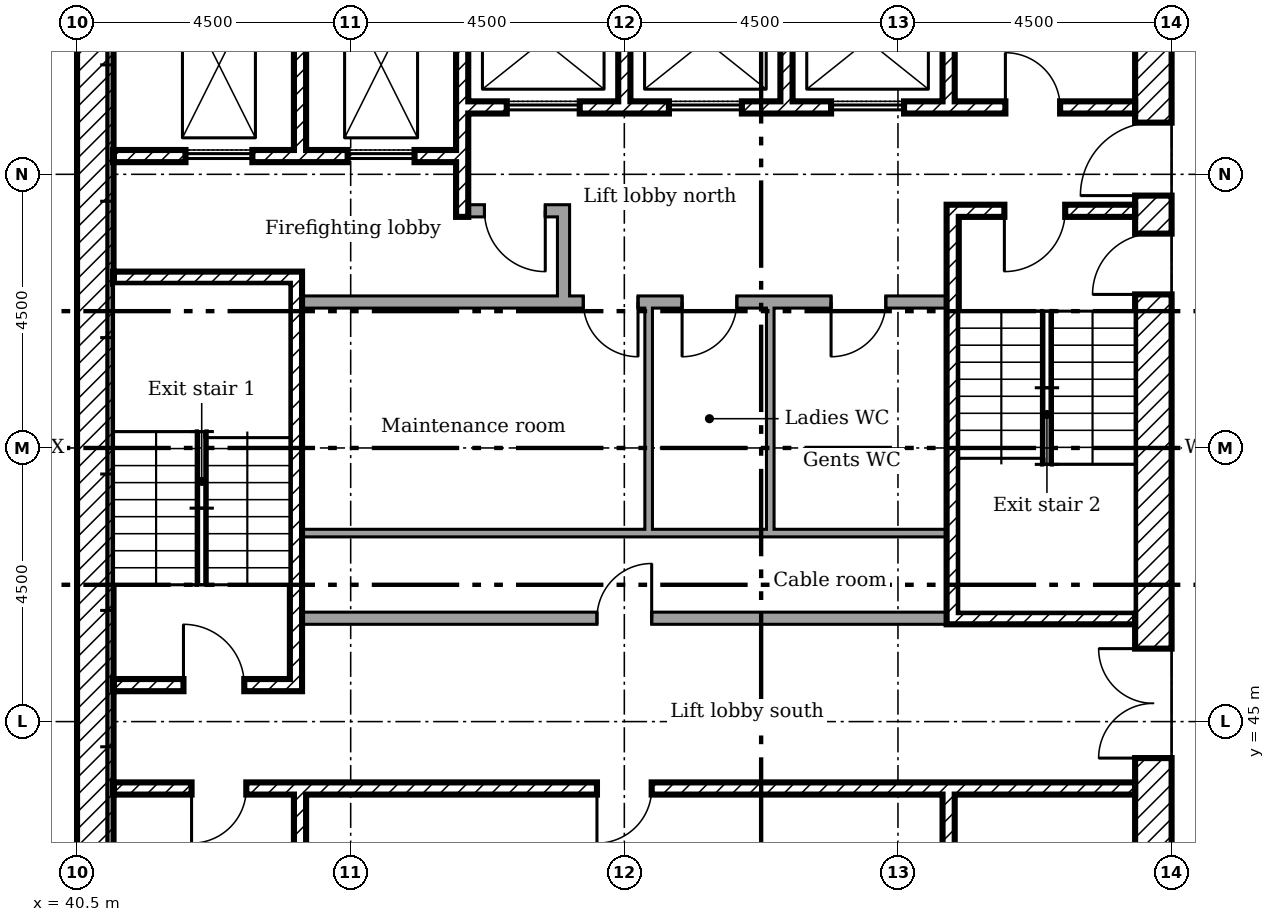
"""IFC4 building model, lengths in metres.
Left out: names, types, materials, properties, quantities, classifications, styles, units other than length and angle.
Written with IfcOpenShell. Run it as: python <this file> out.ifc"""

import sys

from ifc_helpers import new_model, si_unit, direction, frame, frame_2d, origin, place, context, subcontext, project, spatial, rectangle, extrude, element, fill, save


model = new_model("IFC4")
c1 = context("Model", 3, precision=1e-05, world=origin(), true_north=direction((0.0, 1.0)))
c2 = subcontext(c1, "Body", "Model", "MODEL_VIEW")
j1 = project(units=[si_unit("LENGTHUNIT", "METRE"), si_unit("PLANEANGLEUNIT", "RADIAN")], contexts=[c1])
p1 = place(None, origin())
s1 = spatial("IfcSite", under=j1, at=p1, CompositionType="ELEMENT")
p2 = place(p1, origin())
s2 = spatial("IfcBuilding", under=s1, at=p2, CompositionType="ELEMENT")
p3 = place(p2, frame((0.0, 0.0, 176.2)))
s3 = spatial("IfcBuildingStorey", under=s2, at=p3, CompositionType="ELEMENT", Elevation=176.2)
p4 = place(p3, frame((58.2, 40.5, 0.0), z_axis=(0.0, 0.0, 1.0), x_axis=(0.0, 1.0, 0.0)))
e1 = element("IfcWall", 1, at=p4, inside=s3, PredefinedType="SHEAR", context=c2, shape_type="SweptSolid", body=[
    extrude(rectangle(XDim=18.0, YDim=0.6, at=frame_2d((9.0, 0.0))), origin(), (0.0, 0.0, 1.0), 3.35),
])
p5 = place(p4, frame((13.15, 0.0, 0.0)))
e2 = element("IfcOpeningElement", 2, at=p5, cuts=e1, PredefinedType="OPENING", context=c2, shape_type="SweptSolid", body=[
    extrude(rectangle(XDim=1.2, YDim=2.1, at=frame_2d((0.6, 1.05))), frame((0.0, 0.31, 0.0), z_axis=(0.0, -1.0, 0.0), x_axis=(1.0, 0.0, 0.0)), (0.0, 0.0, 1.0), 0.62),
])
p6 = place(p4, frame((3.9, 0.0, 0.0)))
e3 = element("IfcOpeningElement", 3, at=p6, cuts=e1, PredefinedType="OPENING", context=c2, shape_type="SweptSolid", body=[
    extrude(rectangle(XDim=1.8, YDim=2.1, at=frame_2d((0.9, 1.05))), frame((0.0, 0.31, 0.0), z_axis=(0.0, -1.0, 0.0), x_axis=(1.0, 0.0, 0.0)), (0.0, 0.0, 1.0), 0.62),
])
p7 = place(p4, frame((11.525, 0.0, 0.0)))
e4 = element("IfcOpeningElement", 4, at=p7, cuts=e1, PredefinedType="OPENING", context=c2, shape_type="SweptSolid", body=[
    extrude(rectangle(XDim=1.0, YDim=2.1, at=frame_2d((0.5, 1.05))), frame((0.0, 0.31, 0.0), z_axis=(0.0, -1.0, 0.0), x_axis=(1.0, 0.0, 0.0)), (0.0, 0.0, 1.0), 0.62),
])
p8 = place(p3, frame((40.8, 41.1, 0.0), z_axis=(0.0, 0.0, 1.0), x_axis=(0.0, 1.0, 0.0)))
e5 = element("IfcWall", 5, at=p8, inside=s3, PredefinedType="SHEAR", context=c2, shape_type="SweptSolid", body=[
    extrude(rectangle(XDim=16.8, YDim=0.6, at=frame_2d((8.4, 0.0))), origin(), (0.0, 0.0, 1.0), 3.35),
])
p9 = place(p3, frame((44.167, 57.9, 0.0), z_axis=(0.0, 0.0, 1.0), x_axis=(0.0, -1.0, 0.0)))
e6 = element("IfcWall", 6, at=p9, inside=s3, PredefinedType="SHEAR", context=c2, shape_type="SweptSolid", body=[
    extrude(rectangle(XDim=3.5, YDim=0.2, at=frame_2d((1.75, 0.0))), origin(), (0.0, 0.0, 1.0), 3.35),
])
p10 = place(p3, frame((46.833, 57.9, 0.0), z_axis=(0.0, 0.0, 1.0), x_axis=(0.0, -1.0, 0.0)))
e7 = element("IfcWall", 7, at=p10, inside=s3, PredefinedType="SHEAR", context=c2, shape_type="SweptSolid", body=[
    extrude(rectangle(XDim=4.6, YDim=0.2, at=frame_2d((2.3, 0.0))), origin(), (0.0, 0.0, 1.0), 3.35),
])
for number, where, z_axis, x_axis in (
    (8, (49.5, 57.9, 0.0), (0.0, 0.0, 1.0), (0.0, -1.0, 0.0)),
    (9, (52.167, 57.9, 0.0), (0.0, 0.0, 1.0), (0.0, -1.0, 0.0)),
    (10, (54.833, 57.9, 0.0), (0.0, 0.0, 1.0), (0.0, -1.0, 0.0)),
    (11, (44.167, 41.1, 0.0), (0.0, 0.0, 1.0), (0.0, 1.0, 0.0)),
    (12, (54.833, 41.1, 0.0), (0.0, 0.0, 1.0), (0.0, 1.0, 0.0)),
):
    element("IfcWall", number, at=place(p3, frame(where, z_axis=z_axis, x_axis=x_axis)), inside=s3, PredefinedType="SHEAR", context=c2, shape_type="SweptSolid", body=[
        extrude(rectangle(XDim=2.7, YDim=0.2, at=frame_2d((1.35, 0.0))), origin(), (0.0, 0.0, 1.0), 3.35),
    ])
p11 = place(p3, frame((48.5, 51.9, 0.0), z_axis=(0.0, 0.0, 1.0), x_axis=(0.0, 1.0, 0.0)))
e13 = element("IfcWall", 13, at=p11, inside=s3, PredefinedType="PARTITIONING", context=c2, shape_type="SweptSolid", body=[
    extrude(rectangle(XDim=1.6, YDim=0.2, at=frame_2d((0.8, 0.0))), origin(), (0.0, 0.0, 1.0), 3.35),
])
p12 = place(p3, frame((46.933, 53.4, 0.0)))
e14 = element("IfcWall", 14, at=p12, inside=s3, PredefinedType="PARTITIONING", context=c2, shape_type="SweptSolid", body=[
    extrude(rectangle(XDim=1.467, YDim=0.2, at=frame_2d((0.733, 0.0))), origin(), (0.0, 0.0, 1.0), 3.35),
])
p13 = place(p12, frame((0.267, 0.0, 0.0)))
e15 = element("IfcOpeningElement", 15, at=p13, cuts=e14, PredefinedType="OPENING", context=c2, shape_type="SweptSolid", body=[
    extrude(rectangle(XDim=1.0, YDim=2.1, at=frame_2d((0.5, 1.05))), frame((0.0, 0.11, 0.0), z_axis=(0.0, -1.0, 0.0), x_axis=(1.0, 0.0, 0.0)), (0.0, 0.0, 1.0), 0.22),
])
p14 = place(p3, frame((46.933, 55.1, 0.0)))
e16 = element("IfcWall", 16, at=p14, inside=s3, PredefinedType="SHEAR", context=c2, shape_type="SweptSolid", body=[
    extrude(rectangle(XDim=10.967, YDim=0.2, at=frame_2d((5.483, 0.0))), origin(), (0.0, 0.0, 1.0), 3.35),
])
p15 = place(p14, frame((8.833, 0.0, 0.0)))
e17 = element("IfcOpeningElement", 17, at=p15, cuts=e16, PredefinedType="OPENING", context=c2, shape_type="SweptSolid", body=[
    extrude(rectangle(XDim=0.9, YDim=2.1, at=frame_2d((0.45, 1.05))), frame((0.0, 0.11, 0.0), z_axis=(0.0, -1.0, 0.0), x_axis=(1.0, 0.0, 0.0)), (0.0, 0.0, 1.0), 0.22),
])
p16 = place(p14, frame((0.633, 0.0, 0.0)))
e18 = element("IfcOpeningElement", 18, at=p16, cuts=e16, PredefinedType="OPENING", context=c2, shape_type="SweptSolid", body=[
    extrude(rectangle(XDim=1.2, YDim=2.1, at=frame_2d((0.6, 1.05))), frame((0.0, 0.11, 0.0), z_axis=(0.0, -1.0, 0.0), x_axis=(1.0, 0.0, 0.0)), (0.0, 0.0, 1.0), 0.22),
])
p17 = place(p14, frame((3.3, 0.0, 0.0)))
e19 = element("IfcOpeningElement", 19, at=p17, cuts=e16, PredefinedType="OPENING", context=c2, shape_type="SweptSolid", body=[
    extrude(rectangle(XDim=1.2, YDim=2.1, at=frame_2d((0.6, 1.05))), frame((0.0, 0.11, 0.0), z_axis=(0.0, -1.0, 0.0), x_axis=(1.0, 0.0, 0.0)), (0.0, 0.0, 1.0), 0.22),
])
p18 = place(p14, frame((5.967, 0.0, 0.0)))
e20 = element("IfcOpeningElement", 20, at=p18, cuts=e16, PredefinedType="OPENING", context=c2, shape_type="SweptSolid", body=[
    extrude(rectangle(XDim=1.2, YDim=2.1, at=frame_2d((0.6, 1.05))), frame((0.0, 0.11, 0.0), z_axis=(0.0, -1.0, 0.0), x_axis=(1.0, 0.0, 0.0)), (0.0, 0.0, 1.0), 0.22),
])
p19 = place(p3, frame((41.1, 54.3, 0.0)))
e21 = element("IfcWall", 21, at=p19, inside=s3, PredefinedType="SHEAR", context=c2, shape_type="SweptSolid", body=[
    extrude(rectangle(XDim=5.633, YDim=0.2, at=frame_2d((2.817, 0.0))), origin(), (0.0, 0.0, 1.0), 3.35),
])
p20 = place(p19, frame((1.183, 0.0, 0.0)))
e22 = element("IfcOpeningElement", 22, at=p20, cuts=e21, PredefinedType="OPENING", context=c2, shape_type="SweptSolid", body=[
    extrude(rectangle(XDim=1.1, YDim=2.1, at=frame_2d((0.55, 1.05))), frame((0.0, 0.11, 0.0), z_axis=(0.0, -1.0, 0.0), x_axis=(1.0, 0.0, 0.0)), (0.0, 0.0, 1.0), 0.22),
])
p21 = place(p19, frame((3.85, 0.0, 0.0)))
e23 = element("IfcOpeningElement", 23, at=p21, cuts=e21, PredefinedType="OPENING", context=c2, shape_type="SweptSolid", body=[
    extrude(rectangle(XDim=1.1, YDim=2.1, at=frame_2d((0.55, 1.05))), frame((0.0, 0.11, 0.0), z_axis=(0.0, -1.0, 0.0), x_axis=(1.0, 0.0, 0.0)), (0.0, 0.0, 1.0), 0.22),
])
p22 = place(p3, frame((41.1, 43.9, 0.0)))
e24 = element("IfcWall", 24, at=p22, inside=s3, PredefinedType="SHEAR", context=c2, shape_type="SweptSolid", body=[
    extrude(rectangle(XDim=16.8, YDim=0.2, at=frame_2d((8.4, 0.0))), origin(), (0.0, 0.0, 1.0), 3.35),
])
p23 = place(p22, frame((1.283, 0.0, 0.0)))
e25 = element("IfcOpeningElement", 25, at=p23, cuts=e24, PredefinedType="OPENING", context=c2, shape_type="SweptSolid", body=[
    extrude(rectangle(XDim=0.9, YDim=2.1, at=frame_2d((0.45, 1.05))), frame((0.0, 0.11, 0.0), z_axis=(0.0, -1.0, 0.0), x_axis=(1.0, 0.0, 0.0)), (0.0, 0.0, 1.0), 0.22),
])
p24 = place(p22, frame((7.95, 0.0, 0.0)))
e26 = element("IfcOpeningElement", 26, at=p24, cuts=e24, PredefinedType="OPENING", context=c2, shape_type="SweptSolid", body=[
    extrude(rectangle(XDim=0.9, YDim=2.1, at=frame_2d((0.45, 1.05))), frame((0.0, 0.11, 0.0), z_axis=(0.0, -1.0, 0.0), x_axis=(1.0, 0.0, 0.0)), (0.0, 0.0, 1.0), 0.22),
])
p25 = place(p3, frame((44.1, 45.5, 0.0), z_axis=(0.0, 0.0, 1.0), x_axis=(0.0, 1.0, 0.0)))
e27 = element("IfcWall", 27, at=p25, inside=s3, PredefinedType="SHEAR", context=c2, shape_type="SweptSolid", body=[
    extrude(rectangle(XDim=6.9, YDim=0.2, at=frame_2d((3.45, 0.0))), origin(), (0.0, 0.0, 1.0), 3.35),
])
p26 = place(p3, frame((41.1, 52.3, 0.0)))
e28 = element("IfcWall", 28, at=p26, inside=s3, PredefinedType="SHEAR", context=c2, shape_type="SweptSolid", body=[
    extrude(rectangle(XDim=2.9, YDim=0.2, at=frame_2d((1.45, 0.0))), origin(), (0.0, 0.0, 1.0), 3.35),
])
p27 = place(p3, frame((41.1, 45.6, 0.0)))
e29 = element("IfcWall", 29, at=p27, inside=s3, PredefinedType="SHEAR", context=c2, shape_type="SweptSolid", body=[
    extrude(rectangle(XDim=2.9, YDim=0.2, at=frame_2d((1.45, 0.0))), origin(), (0.0, 0.0, 1.0), 3.35),
])
p28 = place(p27, frame((1.15, 0.0, 0.0)))
e30 = element("IfcOpeningElement", 30, at=p28, cuts=e29, PredefinedType="OPENING", context=c2, shape_type="SweptSolid", body=[
    extrude(rectangle(XDim=1.0, YDim=2.1, at=frame_2d((0.5, 1.05))), frame((0.0, 0.11, 0.0), z_axis=(0.0, -1.0, 0.0), x_axis=(1.0, 0.0, 0.0)), (0.0, 0.0, 1.0), 0.22),
])
p29 = place(p3, frame((54.8, 53.4, 0.0)))
e31 = element("IfcWall", 31, at=p29, inside=s3, PredefinedType="SHEAR", context=c2, shape_type="SweptSolid", body=[
    extrude(rectangle(XDim=3.1, YDim=0.2, at=frame_2d((1.55, 0.0))), origin(), (0.0, 0.0, 1.0), 3.35),
])
p30 = place(p29, frame((0.95, 0.0, 0.0)))
e32 = element("IfcOpeningElement", 32, at=p30, cuts=e31, PredefinedType="OPENING", context=c2, shape_type="SweptSolid", body=[
    extrude(rectangle(XDim=1.0, YDim=2.1, at=frame_2d((0.5, 1.05))), frame((0.0, 0.11, 0.0), z_axis=(0.0, -1.0, 0.0), x_axis=(1.0, 0.0, 0.0)), (0.0, 0.0, 1.0), 0.22),
])
p31 = place(p3, frame((54.8, 46.7, 0.0)))
e33 = element("IfcWall", 33, at=p31, inside=s3, PredefinedType="SHEAR", context=c2, shape_type="SweptSolid", body=[
    extrude(rectangle(XDim=3.1, YDim=0.2, at=frame_2d((1.55, 0.0))), origin(), (0.0, 0.0, 1.0), 3.35),
])
p32 = place(p3, frame((54.9, 46.8, 0.0), z_axis=(0.0, 0.0, 1.0), x_axis=(0.0, 1.0, 0.0)))
e34 = element("IfcWall", 34, at=p32, inside=s3, PredefinedType="SHEAR", context=c2, shape_type="SweptSolid", body=[
    extrude(rectangle(XDim=6.5, YDim=0.2, at=frame_2d((3.25, 0.0))), origin(), (0.0, 0.0, 1.0), 3.35),
])
p33 = place(p3, frame((44.2, 51.9, 0.0)))
e35 = element("IfcWall", 35, at=p33, inside=s3, PredefinedType="PARTITIONING", context=c2, shape_type="SweptSolid", body=[
    extrude(rectangle(XDim=10.6, YDim=0.2, at=frame_2d((5.3, 0.0))), origin(), (0.0, 0.0, 1.0), 3.35),
])
p34 = place(p33, frame((4.625, 0.0, 0.0)))
e36 = element("IfcOpeningElement", 36, at=p34, cuts=e35, PredefinedType="OPENING", context=c2, shape_type="SweptSolid", body=[
    extrude(rectangle(XDim=0.9, YDim=2.1, at=frame_2d((0.45, 1.05))), frame((0.0, 0.11, 0.0), z_axis=(0.0, -1.0, 0.0), x_axis=(1.0, 0.0, 0.0)), (0.0, 0.0, 1.0), 0.22),
])
p35 = place(p33, frame((6.25, 0.0, 0.0)))
e37 = element("IfcOpeningElement", 37, at=p35, cuts=e35, PredefinedType="OPENING", context=c2, shape_type="SweptSolid", body=[
    extrude(rectangle(XDim=0.9, YDim=2.1, at=frame_2d((0.45, 1.05))), frame((0.0, 0.11, 0.0), z_axis=(0.0, -1.0, 0.0), x_axis=(1.0, 0.0, 0.0)), (0.0, 0.0, 1.0), 0.22),
])
p36 = place(p33, frame((8.7, 0.0, 0.0)))
e38 = element("IfcOpeningElement", 38, at=p36, cuts=e35, PredefinedType="OPENING", context=c2, shape_type="SweptSolid", body=[
    extrude(rectangle(XDim=0.9, YDim=2.1, at=frame_2d((0.45, 1.05))), frame((0.0, 0.11, 0.0), z_axis=(0.0, -1.0, 0.0), x_axis=(1.0, 0.0, 0.0)), (0.0, 0.0, 1.0), 0.22),
])
p37 = place(p3, frame((44.2, 46.7, 0.0)))
e39 = element("IfcWall", 39, at=p37, inside=s3, PredefinedType="PARTITIONING", context=c2, shape_type="SweptSolid", body=[
    extrude(rectangle(XDim=10.6, YDim=0.2, at=frame_2d((5.3, 0.0))), origin(), (0.0, 0.0, 1.0), 3.35),
])
p38 = place(p37, frame((4.85, 0.0, 0.0)))
e40 = element("IfcOpeningElement", 40, at=p38, cuts=e39, PredefinedType="OPENING", context=c2, shape_type="SweptSolid", body=[
    extrude(rectangle(XDim=0.9, YDim=2.1, at=frame_2d((0.45, 1.05))), frame((0.0, 0.11, 0.0), z_axis=(0.0, -1.0, 0.0), x_axis=(1.0, 0.0, 0.0)), (0.0, 0.0, 1.0), 0.22),
])
p39 = place(p3, frame((49.962, 48.1, 0.0), z_axis=(0.0, 0.0, 1.0), x_axis=(-1.0, 0.0, 0.0)))
e41 = element("IfcWall", 41, at=p39, inside=s3, PredefinedType="PARTITIONING", context=c2, shape_type="SweptSolid", body=[
    extrude(rectangle(XDim=5.762, YDim=0.125, at=frame_2d((2.881, 0.0))), origin(), (0.0, 0.0, 1.0), 3.35),
])
p40 = place(p3, frame((51.962, 48.1, 0.0), z_axis=(0.0, 0.0, 1.0), x_axis=(-1.0, 0.0, 0.0)))
e42 = element("IfcWall", 42, at=p40, inside=s3, PredefinedType="PARTITIONING", context=c2, shape_type="SweptSolid", body=[
    extrude(rectangle(XDim=2.062, YDim=0.125, at=frame_2d((1.031, 0.0))), origin(), (0.0, 0.0, 1.0), 3.35),
])
p41 = place(p3, frame((49.9, 48.163, 0.0), z_axis=(0.0, 0.0, 1.0), x_axis=(0.0, 1.0, 0.0)))
e43 = element("IfcWall", 43, at=p41, inside=s3, PredefinedType="PARTITIONING", context=c2, shape_type="SweptSolid", body=[
    extrude(rectangle(XDim=3.637, YDim=0.125, at=frame_2d((1.819, 0.0))), origin(), (0.0, 0.0, 1.0), 3.35),
])
p42 = place(p3, frame((54.8, 48.1, 0.0), z_axis=(0.0, 0.0, 1.0), x_axis=(-1.0, 0.0, 0.0)))
e44 = element("IfcWall", 44, at=p42, inside=s3, PredefinedType="PARTITIONING", context=c2, shape_type="SweptSolid", body=[
    extrude(rectangle(XDim=2.9, YDim=0.125, at=frame_2d((1.45, 0.0))), origin(), (0.0, 0.0, 1.0), 3.35),
])
p43 = place(p3, frame((51.9, 48.163, 0.0), z_axis=(0.0, 0.0, 1.0), x_axis=(0.0, 1.0, 0.0)))
e45 = element("IfcWall", 45, at=p43, inside=s3, PredefinedType="PARTITIONING", context=c2, shape_type="SweptSolid", body=[
    extrude(rectangle(XDim=3.637, YDim=0.125, at=frame_2d((1.819, 0.0))), origin(), (0.0, 0.0, 1.0), 3.35),
])
p44 = place(p5, origin())
e46 = element("IfcDoor", 46, at=p44, inside=s3, OperationType="SINGLE_SWING_RIGHT", PredefinedType="DOOR", context=c2, shape_type="SweptSolid", body=[
    extrude(rectangle(XDim=1.2, YDim=2.1, at=frame_2d((0.6, 1.05))), frame((0.0, 0.025, 0.0), z_axis=(0.0, -1.0, 0.0), x_axis=(1.0, 0.0, 0.0)), (0.0, 0.0, 1.0), 0.05),
])
fill(e2, e46)
p45 = place(p6, origin())
e47 = element("IfcDoor", 47, at=p45, inside=s3, OperationType="DOUBLE_DOOR_SINGLE_SWING", PredefinedType="DOOR", context=c2, shape_type="SweptSolid", body=[
    extrude(rectangle(XDim=1.8, YDim=2.1, at=frame_2d((0.9, 1.05))), frame((0.0, 0.025, 0.0), z_axis=(0.0, -1.0, 0.0), x_axis=(1.0, 0.0, 0.0)), (0.0, 0.0, 1.0), 0.05),
])
fill(e3, e47)
p46 = place(p28, origin())
e48 = element("IfcDoor", 48, at=p46, inside=s3, OperationType="SINGLE_SWING_RIGHT", PredefinedType="DOOR", context=c2, shape_type="SweptSolid", body=[
    extrude(rectangle(XDim=1.0, YDim=2.1, at=frame_2d((0.5, 1.05))), frame((0.0, 0.025, 0.0), z_axis=(0.0, -1.0, 0.0), x_axis=(1.0, 0.0, 0.0)), (0.0, 0.0, 1.0), 0.05),
])
fill(e30, e48)
p47 = place(p30, frame((1.0, 0.0, 0.0), x_axis=(-1.0, 0.0, 0.0)))
e49 = element("IfcDoor", 49, at=p47, inside=s3, OperationType="SINGLE_SWING_LEFT", PredefinedType="DOOR", context=c2, shape_type="SweptSolid", body=[
    extrude(rectangle(XDim=1.0, YDim=2.1, at=frame_2d((0.5, 1.05))), frame((0.0, 0.025, 0.0), z_axis=(0.0, -1.0, 0.0), x_axis=(1.0, 0.0, 0.0)), (0.0, 0.0, 1.0), 0.05),
])
fill(e32, e49)
p48 = place(p7, origin())
e50 = element("IfcDoor", 50, at=p48, inside=s3, OperationType="SINGLE_SWING_RIGHT", PredefinedType="DOOR", context=c2, shape_type="SweptSolid", body=[
    extrude(rectangle(XDim=1.0, YDim=2.1, at=frame_2d((0.5, 1.05))), frame((0.0, 0.025, 0.0), z_axis=(0.0, -1.0, 0.0), x_axis=(1.0, 0.0, 0.0)), (0.0, 0.0, 1.0), 0.05),
])
fill(e4, e50)
p49 = place(p13, frame((1.0, 0.0, 0.0), x_axis=(-1.0, 0.0, 0.0)))
e51 = element("IfcDoor", 51, at=p49, inside=s3, OperationType="SINGLE_SWING_RIGHT", PredefinedType="DOOR", context=c2, shape_type="SweptSolid", body=[
    extrude(rectangle(XDim=1.0, YDim=2.1, at=frame_2d((0.5, 1.05))), frame((0.0, 0.025, 0.0), z_axis=(0.0, -1.0, 0.0), x_axis=(1.0, 0.0, 0.0)), (0.0, 0.0, 1.0), 0.05),
])
fill(e15, e51)
p50 = place(p15, origin())
e52 = element("IfcDoor", 52, at=p50, inside=s3, OperationType="SINGLE_SWING_RIGHT", PredefinedType="DOOR", context=c2, shape_type="SweptSolid", body=[
    extrude(rectangle(XDim=0.9, YDim=2.1, at=frame_2d((0.45, 1.05))), frame((0.0, 0.025, 0.0), z_axis=(0.0, -1.0, 0.0), x_axis=(1.0, 0.0, 0.0)), (0.0, 0.0, 1.0), 0.05),
])
fill(e17, e52)
p51 = place(p23, frame((0.9, 0.0, 0.0), x_axis=(-1.0, 0.0, 0.0)))
e53 = element("IfcDoor", 53, at=p51, inside=s3, OperationType="SINGLE_SWING_LEFT", PredefinedType="DOOR", context=c2, shape_type="SweptSolid", body=[
    extrude(rectangle(XDim=0.9, YDim=2.1, at=frame_2d((0.45, 1.05))), frame((0.0, 0.025, 0.0), z_axis=(0.0, -1.0, 0.0), x_axis=(1.0, 0.0, 0.0)), (0.0, 0.0, 1.0), 0.05),
])
fill(e25, e53)
p52 = place(p24, frame((0.9, 0.0, 0.0), x_axis=(-1.0, 0.0, 0.0)))
e54 = element("IfcDoor", 54, at=p52, inside=s3, OperationType="SINGLE_SWING_LEFT", PredefinedType="DOOR", context=c2, shape_type="SweptSolid", body=[
    extrude(rectangle(XDim=0.9, YDim=2.1, at=frame_2d((0.45, 1.05))), frame((0.0, 0.025, 0.0), z_axis=(0.0, -1.0, 0.0), x_axis=(1.0, 0.0, 0.0)), (0.0, 0.0, 1.0), 0.05),
])
fill(e26, e54)
p53 = place(p38, origin())
e55 = element("IfcDoor", 55, at=p53, inside=s3, OperationType="SINGLE_SWING_LEFT", PredefinedType="DOOR", context=c2, shape_type="SweptSolid", body=[
    extrude(rectangle(XDim=0.9, YDim=2.1, at=frame_2d((0.45, 1.05))), frame((0.0, 0.025, 0.0), z_axis=(0.0, -1.0, 0.0), x_axis=(1.0, 0.0, 0.0)), (0.0, 0.0, 1.0), 0.05),
])
fill(e40, e55)
p54 = place(p34, frame((0.9, 0.0, 0.0), x_axis=(-1.0, 0.0, 0.0)))
e56 = element("IfcDoor", 56, at=p54, inside=s3, OperationType="SINGLE_SWING_RIGHT", PredefinedType="DOOR", context=c2, shape_type="SweptSolid", body=[
    extrude(rectangle(XDim=0.9, YDim=2.1, at=frame_2d((0.45, 1.05))), frame((0.0, 0.025, 0.0), z_axis=(0.0, -1.0, 0.0), x_axis=(1.0, 0.0, 0.0)), (0.0, 0.0, 1.0), 0.05),
])
fill(e36, e56)
p55 = place(p35, frame((0.9, 0.0, 0.0), x_axis=(-1.0, 0.0, 0.0)))
e57 = element("IfcDoor", 57, at=p55, inside=s3, OperationType="SINGLE_SWING_LEFT", PredefinedType="DOOR", context=c2, shape_type="SweptSolid", body=[
    extrude(rectangle(XDim=0.9, YDim=2.1, at=frame_2d((0.45, 1.05))), frame((0.0, 0.025, 0.0), z_axis=(0.0, -1.0, 0.0), x_axis=(1.0, 0.0, 0.0)), (0.0, 0.0, 1.0), 0.05),
])
fill(e37, e57)
p56 = place(p36, frame((0.9, 0.0, 0.0), x_axis=(-1.0, 0.0, 0.0)))
e58 = element("IfcDoor", 58, at=p56, inside=s3, OperationType="SINGLE_SWING_LEFT", PredefinedType="DOOR", context=c2, shape_type="SweptSolid", body=[
    extrude(rectangle(XDim=0.9, YDim=2.1, at=frame_2d((0.45, 1.05))), frame((0.0, 0.025, 0.0), z_axis=(0.0, -1.0, 0.0), x_axis=(1.0, 0.0, 0.0)), (0.0, 0.0, 1.0), 0.05),
])
fill(e38, e58)
p57 = place(p20, origin())
e59 = element("IfcDoor", 59, at=p57, inside=s3, OperationType="SLIDING_TO_LEFT", PredefinedType="DOOR", context=c2, shape_type="SweptSolid", body=[
    extrude(rectangle(XDim=1.1, YDim=2.1, at=frame_2d((0.55, 1.05))), frame((0.0, 0.025, 0.0), z_axis=(0.0, -1.0, 0.0), x_axis=(1.0, 0.0, 0.0)), (0.0, 0.0, 1.0), 0.05),
])
fill(e22, e59)
p58 = place(p21, origin())
e60 = element("IfcDoor", 60, at=p58, inside=s3, OperationType="SLIDING_TO_LEFT", PredefinedType="DOOR", context=c2, shape_type="SweptSolid", body=[
    extrude(rectangle(XDim=1.1, YDim=2.1, at=frame_2d((0.55, 1.05))), frame((0.0, 0.025, 0.0), z_axis=(0.0, -1.0, 0.0), x_axis=(1.0, 0.0, 0.0)), (0.0, 0.0, 1.0), 0.05),
])
fill(e23, e60)
p59 = place(p16, origin())
e61 = element("IfcDoor", 61, at=p59, inside=s3, OperationType="SLIDING_TO_LEFT", PredefinedType="DOOR", context=c2, shape_type="SweptSolid", body=[
    extrude(rectangle(XDim=1.2, YDim=2.1, at=frame_2d((0.6, 1.05))), frame((0.0, 0.025, 0.0), z_axis=(0.0, -1.0, 0.0), x_axis=(1.0, 0.0, 0.0)), (0.0, 0.0, 1.0), 0.05),
])
fill(e18, e61)
p60 = place(p17, origin())
e62 = element("IfcDoor", 62, at=p60, inside=s3, OperationType="SLIDING_TO_LEFT", PredefinedType="DOOR", context=c2, shape_type="SweptSolid", body=[
    extrude(rectangle(XDim=1.2, YDim=2.1, at=frame_2d((0.6, 1.05))), frame((0.0, 0.025, 0.0), z_axis=(0.0, -1.0, 0.0), x_axis=(1.0, 0.0, 0.0)), (0.0, 0.0, 1.0), 0.05),
])
fill(e19, e62)
p61 = place(p18, origin())
e63 = element("IfcDoor", 63, at=p61, inside=s3, OperationType="SLIDING_TO_LEFT", PredefinedType="DOOR", context=c2, shape_type="SweptSolid", body=[
    extrude(rectangle(XDim=1.2, YDim=2.1, at=frame_2d((0.6, 1.05))), frame((0.0, 0.025, 0.0), z_axis=(0.0, -1.0, 0.0), x_axis=(1.0, 0.0, 0.0)), (0.0, 0.0, 1.0), 0.05),
])
fill(e20, e63)
save(model, sys.argv[1])
